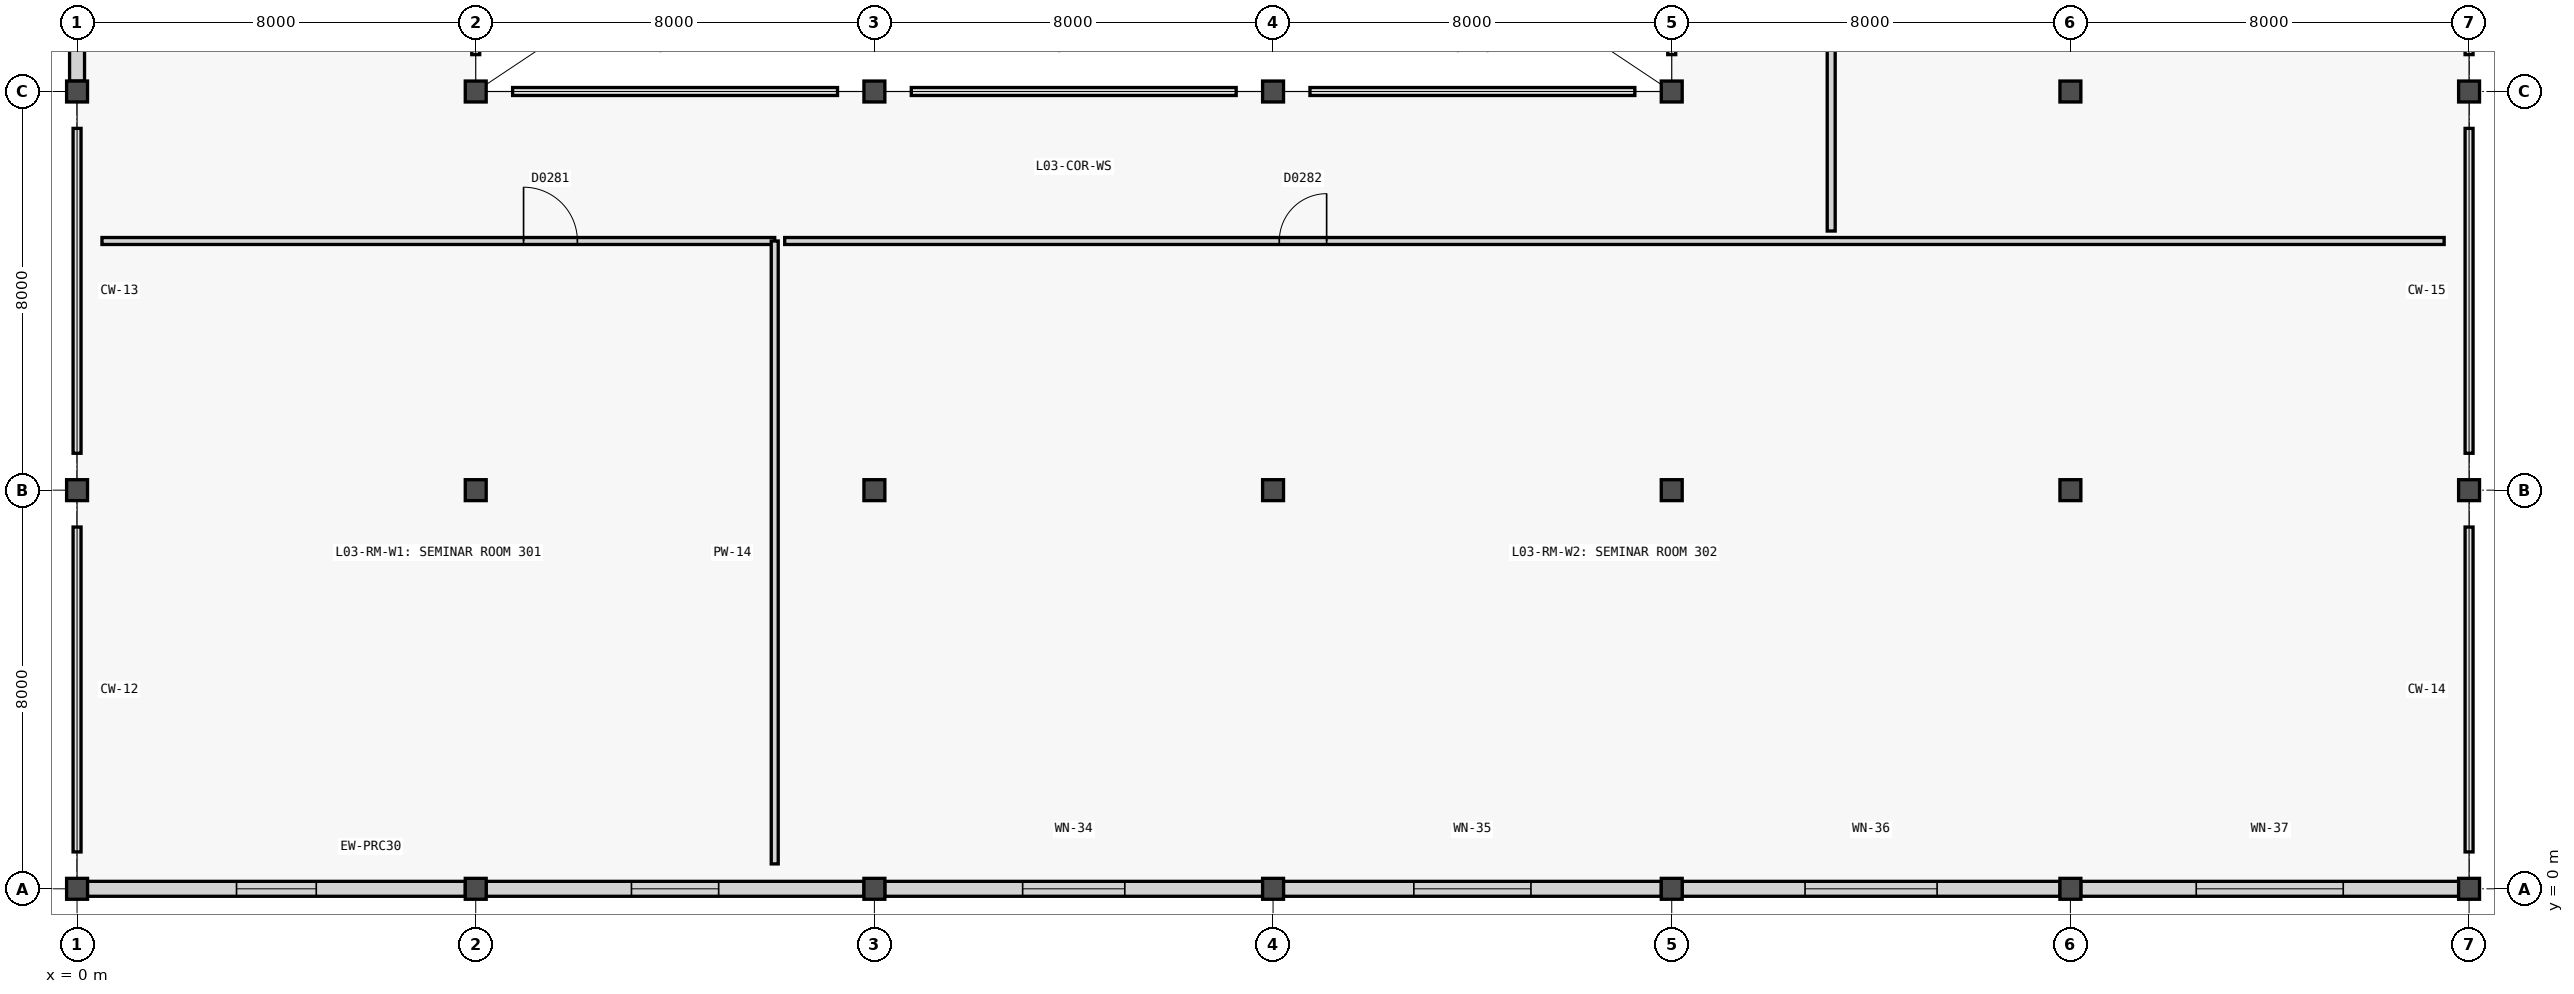
"""IFC4 building model, lengths in metres.
Left out: names, types, materials, properties, quantities, classifications, styles, units other than length and angle.
Written with IfcOpenShell. Run it as: python <this file> out.ifc"""

import sys

from ifc_helpers import new_model, si_unit, direction, frame, frame_2d, origin, origin_2d, place, context, subcontext, project, spatial, rectangle, extrude, element, fill, save


model = new_model("IFC4")
c1 = context("Model", 3, precision=1e-05, world=origin(), true_north=direction((0.0, 1.0)))
c2 = subcontext(c1, "Body", "Model", "MODEL_VIEW")
j1 = project(units=[si_unit("LENGTHUNIT", "METRE"), si_unit("PLANEANGLEUNIT", "RADIAN")], contexts=[c1])
p1 = place(None, origin())
s1 = spatial("IfcSite", under=j1, at=p1, CompositionType="ELEMENT")
p2 = place(p1, origin())
s2 = spatial("IfcBuilding", under=s1, at=p2, CompositionType="ELEMENT")
p3 = place(p2, frame((0.0, 0.0, 14.4)))
s3 = spatial("IfcBuildingStorey", under=s2, at=p3, CompositionType="ELEMENT", Elevation=14.4)
for number, where, z_axis, x_axis in (
    (1, (0.0, 0.0, 0.0), (0.0, 0.0, 1.0), (1.0, 0.0, 0.0)),
    (2, (0.0, 8.0, 0.0), (0.0, 0.0, 1.0), (1.0, 0.0, 0.0)),
):
    element("IfcColumn", number, at=place(p3, frame(where, z_axis=z_axis, x_axis=x_axis)), inside=s3, PredefinedType="COLUMN", context=c2, shape_type="SweptSolid", body=[
        extrude(rectangle(XDim=0.42, YDim=0.42, at=origin_2d()), origin(), (0.0, 0.0, 1.0), 3.34),
    ])
p4 = place(p3, frame((0.0, 16.0, 0.0), z_axis=(0.0, 0.0, 1.0), x_axis=(1.0, 0.0, 0.0)))
e3 = element("IfcColumn", 3, at=p4, inside=s3, PredefinedType="COLUMN", context=c2, shape_type="SweptSolid", body=[
    extrude(rectangle(XDim=0.42, YDim=0.42, at=origin_2d()), origin(), (0.0, 0.0, 1.0), 3.6),
])
for number, where, z_axis, x_axis in (
    (4, (8.0, 0.0, 0.0), (0.0, 0.0, 1.0), (1.0, 0.0, 0.0)),
    (5, (8.0, 8.0, 0.0), (0.0, 0.0, 1.0), (1.0, 0.0, 0.0)),
):
    element("IfcColumn", number, at=place(p3, frame(where, z_axis=z_axis, x_axis=x_axis)), inside=s3, PredefinedType="COLUMN", context=c2, shape_type="SweptSolid", body=[
        extrude(rectangle(XDim=0.42, YDim=0.42, at=origin_2d()), origin(), (0.0, 0.0, 1.0), 3.34),
    ])
p5 = place(p3, frame((8.0, 16.0, 0.0), z_axis=(0.0, 0.0, 1.0), x_axis=(1.0, 0.0, 0.0)))
e6 = element("IfcColumn", 6, at=p5, inside=s3, PredefinedType="COLUMN", context=c2, shape_type="SweptSolid", body=[
    extrude(rectangle(XDim=0.42, YDim=0.42, at=origin_2d()), origin(), (0.0, 0.0, 1.0), 3.6),
])
for number, where, z_axis, x_axis in (
    (7, (16.0, 0.0, 0.0), (0.0, 0.0, 1.0), (1.0, 0.0, 0.0)),
    (8, (16.0, 8.0, 0.0), (0.0, 0.0, 1.0), (1.0, 0.0, 0.0)),
):
    element("IfcColumn", number, at=place(p3, frame(where, z_axis=z_axis, x_axis=x_axis)), inside=s3, PredefinedType="COLUMN", context=c2, shape_type="SweptSolid", body=[
        extrude(rectangle(XDim=0.42, YDim=0.42, at=origin_2d()), origin(), (0.0, 0.0, 1.0), 3.34),
    ])
p6 = place(p3, frame((16.0, 16.0, 0.0), z_axis=(0.0, 0.0, 1.0), x_axis=(1.0, 0.0, 0.0)))
e9 = element("IfcColumn", 9, at=p6, inside=s3, PredefinedType="COLUMN", context=c2, shape_type="SweptSolid", body=[
    extrude(rectangle(XDim=0.42, YDim=0.42, at=origin_2d()), origin(), (0.0, 0.0, 1.0), 3.6),
])
for number, where, z_axis, x_axis in (
    (10, (24.0, 0.0, 0.0), (0.0, 0.0, 1.0), (1.0, 0.0, 0.0)),
    (11, (24.0, 8.0, 0.0), (0.0, 0.0, 1.0), (1.0, 0.0, 0.0)),
):
    element("IfcColumn", number, at=place(p3, frame(where, z_axis=z_axis, x_axis=x_axis)), inside=s3, PredefinedType="COLUMN", context=c2, shape_type="SweptSolid", body=[
        extrude(rectangle(XDim=0.42, YDim=0.42, at=origin_2d()), origin(), (0.0, 0.0, 1.0), 3.34),
    ])
p7 = place(p3, frame((24.0, 16.0, 0.0), z_axis=(0.0, 0.0, 1.0), x_axis=(1.0, 0.0, 0.0)))
e12 = element("IfcColumn", 12, at=p7, inside=s3, PredefinedType="COLUMN", context=c2, shape_type="SweptSolid", body=[
    extrude(rectangle(XDim=0.42, YDim=0.42, at=origin_2d()), origin(), (0.0, 0.0, 1.0), 3.6),
])
for number, where, z_axis, x_axis in (
    (13, (32.0, 0.0, 0.0), (0.0, 0.0, 1.0), (1.0, 0.0, 0.0)),
    (14, (32.0, 8.0, 0.0), (0.0, 0.0, 1.0), (1.0, 0.0, 0.0)),
):
    element("IfcColumn", number, at=place(p3, frame(where, z_axis=z_axis, x_axis=x_axis)), inside=s3, PredefinedType="COLUMN", context=c2, shape_type="SweptSolid", body=[
        extrude(rectangle(XDim=0.42, YDim=0.42, at=origin_2d()), origin(), (0.0, 0.0, 1.0), 3.34),
    ])
p8 = place(p3, frame((32.0, 16.0, 0.0), z_axis=(0.0, 0.0, 1.0), x_axis=(1.0, 0.0, 0.0)))
e15 = element("IfcColumn", 15, at=p8, inside=s3, PredefinedType="COLUMN", context=c2, shape_type="SweptSolid", body=[
    extrude(rectangle(XDim=0.42, YDim=0.42, at=origin_2d()), origin(), (0.0, 0.0, 1.0), 3.6),
])
for number, where, z_axis, x_axis in (
    (16, (40.0, 0.0, 0.0), (0.0, 0.0, 1.0), (1.0, 0.0, 0.0)),
    (17, (40.0, 8.0, 0.0), (0.0, 0.0, 1.0), (1.0, 0.0, 0.0)),
):
    element("IfcColumn", number, at=place(p3, frame(where, z_axis=z_axis, x_axis=x_axis)), inside=s3, PredefinedType="COLUMN", context=c2, shape_type="SweptSolid", body=[
        extrude(rectangle(XDim=0.42, YDim=0.42, at=origin_2d()), origin(), (0.0, 0.0, 1.0), 3.34),
    ])
p9 = place(p3, frame((40.0, 16.0, 0.0), z_axis=(0.0, 0.0, 1.0), x_axis=(1.0, 0.0, 0.0)))
e18 = element("IfcColumn", 18, at=p9, inside=s3, PredefinedType="COLUMN", context=c2, shape_type="SweptSolid", body=[
    extrude(rectangle(XDim=0.42, YDim=0.42, at=origin_2d()), origin(), (0.0, 0.0, 1.0), 3.6),
])
for number, where, z_axis, x_axis in (
    (19, (48.0, 0.0, 0.0), (0.0, 0.0, 1.0), (1.0, 0.0, 0.0)),
    (20, (48.0, 8.0, 0.0), (0.0, 0.0, 1.0), (1.0, 0.0, 0.0)),
):
    element("IfcColumn", number, at=place(p3, frame(where, z_axis=z_axis, x_axis=x_axis)), inside=s3, PredefinedType="COLUMN", context=c2, shape_type="SweptSolid", body=[
        extrude(rectangle(XDim=0.42, YDim=0.42, at=origin_2d()), origin(), (0.0, 0.0, 1.0), 3.34),
    ])
p10 = place(p3, frame((48.0, 16.0, 0.0), z_axis=(0.0, 0.0, 1.0), x_axis=(1.0, 0.0, 0.0)))
e21 = element("IfcColumn", 21, at=p10, inside=s3, PredefinedType="COLUMN", context=c2, shape_type="SweptSolid", body=[
    extrude(rectangle(XDim=0.42, YDim=0.42, at=origin_2d()), origin(), (0.0, 0.0, 1.0), 3.6),
])
p11 = place(p3, frame((0.0, 16.208, 0.0), z_axis=(0.0, 0.0, 1.0), x_axis=(0.0, 1.0, 0.0)))
e22 = element("IfcWall", 22, at=p11, inside=s3, PredefinedType="SOLIDWALL", context=c2, shape_type="SweptSolid", body=[
    extrude(rectangle(XDim=7.584, YDim=0.3, at=frame_2d((3.792, 0.0))), origin(), (0.0, 0.0, 1.0), 2.78),
])
p12 = place(p11, frame((3.092, 0.0, 0.79)))
e23 = element("IfcOpeningElement", 23, at=p12, cuts=e22, PredefinedType="OPENING", context=c2, shape_type="SweptSolid", body=[
    extrude(rectangle(XDim=1.4, YDim=1.85, at=frame_2d((0.7, 0.925))), frame((0.0, 0.16, 0.0), z_axis=(0.0, -1.0, 0.0), x_axis=(1.0, 0.0, 0.0)), (0.0, 0.0, 1.0), 0.32),
])
p13 = place(p3, frame((7.792, 0.0, 0.0), z_axis=(0.0, 0.0, 1.0), x_axis=(-1.0, 0.0, 0.0)))
e24 = element("IfcWall", 24, at=p13, inside=s3, PredefinedType="SOLIDWALL", context=c2, shape_type="SweptSolid", body=[
    extrude(rectangle(XDim=7.584, YDim=0.3, at=frame_2d((3.792, 0.0))), origin(), (0.0, 0.0, 1.0), 2.78),
])
p14 = place(p13, frame((2.992, 0.0, 0.69)))
e25 = element("IfcOpeningElement", 25, at=p14, cuts=e24, PredefinedType="OPENING", context=c2, shape_type="SweptSolid", body=[
    extrude(rectangle(XDim=1.6, YDim=1.95, at=frame_2d((0.8, 0.975))), frame((0.0, 0.16, 0.0), z_axis=(0.0, -1.0, 0.0), x_axis=(1.0, 0.0, 0.0)), (0.0, 0.0, 1.0), 0.32),
])
p15 = place(p3, frame((15.792, 0.0, 0.0), z_axis=(0.0, 0.0, 1.0), x_axis=(-1.0, 0.0, 0.0)))
e26 = element("IfcWall", 26, at=p15, inside=s3, PredefinedType="SOLIDWALL", context=c2, shape_type="SweptSolid", body=[
    extrude(rectangle(XDim=7.584, YDim=0.3, at=frame_2d((3.792, 0.0))), origin(), (0.0, 0.0, 1.0), 2.78),
])
p16 = place(p15, frame((2.917, 0.0, 0.84)))
e27 = element("IfcOpeningElement", 27, at=p16, cuts=e26, PredefinedType="OPENING", context=c2, shape_type="SweptSolid", body=[
    extrude(rectangle(XDim=1.75, YDim=1.8, at=frame_2d((0.875, 0.9))), frame((0.0, 0.16, 0.0), z_axis=(0.0, -1.0, 0.0), x_axis=(1.0, 0.0, 0.0)), (0.0, 0.0, 1.0), 0.32),
])
p17 = place(p3, frame((23.792, 0.0, 0.0), z_axis=(0.0, 0.0, 1.0), x_axis=(-1.0, 0.0, 0.0)))
e28 = element("IfcWall", 28, at=p17, inside=s3, PredefinedType="SOLIDWALL", context=c2, shape_type="SweptSolid", body=[
    extrude(rectangle(XDim=7.584, YDim=0.3, at=frame_2d((3.792, 0.0))), origin(), (0.0, 0.0, 1.0), 2.78),
])
p18 = place(p17, frame((2.767, 0.0, 0.88)))
e29 = element("IfcOpeningElement", 29, at=p18, cuts=e28, PredefinedType="OPENING", context=c2, shape_type="SweptSolid", body=[
    extrude(rectangle(XDim=2.05, YDim=1.45, at=frame_2d((1.025, 0.725))), frame((0.0, 0.16, 0.0), z_axis=(0.0, -1.0, 0.0), x_axis=(1.0, 0.0, 0.0)), (0.0, 0.0, 1.0), 0.32),
])
p19 = place(p3, frame((31.792, 0.0, 0.0), z_axis=(0.0, 0.0, 1.0), x_axis=(-1.0, 0.0, 0.0)))
e30 = element("IfcWall", 30, at=p19, inside=s3, PredefinedType="SOLIDWALL", context=c2, shape_type="SweptSolid", body=[
    extrude(rectangle(XDim=7.584, YDim=0.3, at=frame_2d((3.792, 0.0))), origin(), (0.0, 0.0, 1.0), 2.78),
])
p20 = place(p19, frame((2.617, 0.0, 0.88)))
e31 = element("IfcOpeningElement", 31, at=p20, cuts=e30, PredefinedType="OPENING", context=c2, shape_type="SweptSolid", body=[
    extrude(rectangle(XDim=2.35, YDim=1.4, at=frame_2d((1.175, 0.7))), frame((0.0, 0.16, 0.0), z_axis=(0.0, -1.0, 0.0), x_axis=(1.0, 0.0, 0.0)), (0.0, 0.0, 1.0), 0.32),
])
p21 = place(p3, frame((39.792, 0.0, 0.0), z_axis=(0.0, 0.0, 1.0), x_axis=(-1.0, 0.0, 0.0)))
e32 = element("IfcWall", 32, at=p21, inside=s3, PredefinedType="SOLIDWALL", context=c2, shape_type="SweptSolid", body=[
    extrude(rectangle(XDim=7.584, YDim=0.3, at=frame_2d((3.792, 0.0))), origin(), (0.0, 0.0, 1.0), 2.78),
])
p22 = place(p21, frame((2.467, 0.0, 0.88)))
e33 = element("IfcOpeningElement", 33, at=p22, cuts=e32, PredefinedType="OPENING", context=c2, shape_type="SweptSolid", body=[
    extrude(rectangle(XDim=2.65, YDim=1.5, at=frame_2d((1.325, 0.75))), frame((0.0, 0.16, 0.0), z_axis=(0.0, -1.0, 0.0), x_axis=(1.0, 0.0, 0.0)), (0.0, 0.0, 1.0), 0.32),
])
p23 = place(p3, frame((47.792, 0.0, 0.0), z_axis=(0.0, 0.0, 1.0), x_axis=(-1.0, 0.0, 0.0)))
e34 = element("IfcWall", 34, at=p23, inside=s3, PredefinedType="SOLIDWALL", context=c2, shape_type="SweptSolid", body=[
    extrude(rectangle(XDim=7.584, YDim=0.3, at=frame_2d((3.792, 0.0))), origin(), (0.0, 0.0, 1.0), 2.78),
])
p24 = place(p23, frame((2.317, 0.0, 0.88)))
e35 = element("IfcOpeningElement", 35, at=p24, cuts=e34, PredefinedType="OPENING", context=c2, shape_type="SweptSolid", body=[
    extrude(rectangle(XDim=2.95, YDim=1.55, at=frame_2d((1.475, 0.775))), frame((0.0, 0.16, 0.0), z_axis=(0.0, -1.0, 0.0), x_axis=(1.0, 0.0, 0.0)), (0.0, 0.0, 1.0), 0.32),
])
p25 = place(p3, frame((0.5, 13.0, 0.0), z_axis=(0.0, 0.0, 1.0), x_axis=(1.0, 0.0, 0.0)))
e36 = element("IfcWall", 36, at=p25, inside=s3, PredefinedType="PARTITIONING", context=c2, shape_type="SweptSolid", body=[
    extrude(rectangle(XDim=13.5, YDim=0.14, at=frame_2d((6.75, 0.0))), origin(), (0.0, 0.0, 1.0), 3.34),
])
p26 = place(p25, frame((8.46, 0.0, 0.0)))
e37 = element("IfcOpeningElement", 37, at=p26, cuts=e36, PredefinedType="OPENING", context=c2, shape_type="SweptSolid", body=[
    extrude(rectangle(XDim=1.08, YDim=2.2, at=frame_2d((0.54, 1.1))), frame((0.0, 0.08, 0.0), z_axis=(0.0, -1.0, 0.0), x_axis=(1.0, 0.0, 0.0)), (0.0, 0.0, 1.0), 0.16),
])
p27 = place(p3, frame((14.0, 0.5, 0.0), z_axis=(0.0, 0.0, 1.0), x_axis=(0.0, 1.0, 0.0)))
e38 = element("IfcWall", 38, at=p27, inside=s3, PredefinedType="PARTITIONING", context=c2, shape_type="SweptSolid", body=[
    extrude(rectangle(XDim=12.5, YDim=0.14, at=frame_2d((6.25, 0.0))), origin(), (0.0, 0.0, 1.0), 3.34),
])
p28 = place(p3, frame((14.2, 13.0, 0.0), z_axis=(0.0, 0.0, 1.0), x_axis=(1.0, 0.0, 0.0)))
e39 = element("IfcWall", 39, at=p28, inside=s3, PredefinedType="PARTITIONING", context=c2, shape_type="SweptSolid", body=[
    extrude(rectangle(XDim=33.3, YDim=0.14, at=frame_2d((16.65, 0.0))), origin(), (0.0, 0.0, 1.0), 3.34),
])
p29 = place(p28, frame((9.925, 0.0, 0.0)))
e40 = element("IfcOpeningElement", 40, at=p29, cuts=e39, PredefinedType="OPENING", context=c2, shape_type="SweptSolid", body=[
    extrude(rectangle(XDim=0.95, YDim=2.1, at=frame_2d((0.475, 1.05))), frame((0.0, 0.08, 0.0), z_axis=(0.0, -1.0, 0.0), x_axis=(1.0, 0.0, 0.0)), (0.0, 0.0, 1.0), 0.16),
])
p30 = place(p3, frame((35.2, 13.2, 0.0), z_axis=(0.0, 0.0, 1.0), x_axis=(0.0, 1.0, 0.0)))
e41 = element("IfcWall", 41, at=p30, inside=s3, PredefinedType="PARTITIONING", context=c2, shape_type="SweptSolid", body=[
    extrude(rectangle(XDim=26.6, YDim=0.16, at=frame_2d((13.3, 0.0))), origin(), (0.0, 0.0, 1.0), 3.34),
])
p31 = place(p30, frame((13.825, 0.0, 0.0)))
e42 = element("IfcOpeningElement", 42, at=p31, cuts=e41, PredefinedType="OPENING", context=c2, shape_type="SweptSolid", body=[
    extrude(rectangle(XDim=1.75, YDim=2.2, at=frame_2d((0.875, 1.1))), frame((0.0, 0.09, 0.0), z_axis=(0.0, -1.0, 0.0), x_axis=(1.0, 0.0, 0.0)), (0.0, 0.0, 1.0), 0.18),
])
p32 = place(p14, origin())
e43 = element("IfcWindow", 43, at=p32, inside=s3, PartitioningType="SINGLE_PANEL", PredefinedType="WINDOW", context=c2, shape_type="SweptSolid", body=[
    extrude(rectangle(XDim=1.6, YDim=1.95, at=frame_2d((0.8, 0.975))), frame((0.0, 0.03, 0.0), z_axis=(0.0, -1.0, 0.0), x_axis=(1.0, 0.0, 0.0)), (0.0, 0.0, 1.0), 0.06),
])
fill(e25, e43)
p33 = place(p16, origin())
e44 = element("IfcWindow", 44, at=p33, inside=s3, PartitioningType="SINGLE_PANEL", PredefinedType="WINDOW", context=c2, shape_type="SweptSolid", body=[
    extrude(rectangle(XDim=1.75, YDim=1.8, at=frame_2d((0.875, 0.9))), frame((0.0, 0.03, 0.0), z_axis=(0.0, -1.0, 0.0), x_axis=(1.0, 0.0, 0.0)), (0.0, 0.0, 1.0), 0.06),
])
fill(e27, e44)
p34 = place(p18, origin())
e45 = element("IfcWindow", 45, at=p34, inside=s3, PartitioningType="SINGLE_PANEL", PredefinedType="WINDOW", context=c2, shape_type="SweptSolid", body=[
    extrude(rectangle(XDim=2.05, YDim=1.45, at=frame_2d((1.025, 0.725))), frame((0.0, 0.03, 0.0), z_axis=(0.0, -1.0, 0.0), x_axis=(1.0, 0.0, 0.0)), (0.0, 0.0, 1.0), 0.06),
])
fill(e29, e45)
p35 = place(p20, origin())
e46 = element("IfcWindow", 46, at=p35, inside=s3, PartitioningType="SINGLE_PANEL", PredefinedType="WINDOW", context=c2, shape_type="SweptSolid", body=[
    extrude(rectangle(XDim=2.35, YDim=1.4, at=frame_2d((1.175, 0.7))), frame((0.0, 0.03, 0.0), z_axis=(0.0, -1.0, 0.0), x_axis=(1.0, 0.0, 0.0)), (0.0, 0.0, 1.0), 0.06),
])
fill(e31, e46)
p36 = place(p22, origin())
e47 = element("IfcWindow", 47, at=p36, inside=s3, PartitioningType="SINGLE_PANEL", PredefinedType="WINDOW", context=c2, shape_type="SweptSolid", body=[
    extrude(rectangle(XDim=2.65, YDim=1.5, at=frame_2d((1.325, 0.75))), frame((0.0, 0.03, 0.0), z_axis=(0.0, -1.0, 0.0), x_axis=(1.0, 0.0, 0.0)), (0.0, 0.0, 1.0), 0.06),
])
fill(e33, e47)
p37 = place(p24, origin())
e48 = element("IfcWindow", 48, at=p37, inside=s3, PartitioningType="SINGLE_PANEL", PredefinedType="WINDOW", context=c2, shape_type="SweptSolid", body=[
    extrude(rectangle(XDim=2.95, YDim=1.55, at=frame_2d((1.475, 0.775))), frame((0.0, 0.03, 0.0), z_axis=(0.0, -1.0, 0.0), x_axis=(1.0, 0.0, 0.0)), (0.0, 0.0, 1.0), 0.06),
])
fill(e35, e48)
p38 = place(p26, origin())
e49 = element("IfcDoor", 49, at=p38, inside=s3, OperationType="SINGLE_SWING_LEFT", PredefinedType="DOOR", context=c2, shape_type="SweptSolid", body=[
    extrude(rectangle(XDim=1.08, YDim=2.2, at=frame_2d((0.54, 1.1))), frame((0.0, 0.025, 0.0), z_axis=(0.0, -1.0, 0.0), x_axis=(1.0, 0.0, 0.0)), (0.0, 0.0, 1.0), 0.05),
])
fill(e37, e49)
p39 = place(p29, origin())
e50 = element("IfcDoor", 50, at=p39, inside=s3, OperationType="SINGLE_SWING_RIGHT", PredefinedType="DOOR", context=c2, shape_type="SweptSolid", body=[
    extrude(rectangle(XDim=0.95, YDim=2.1, at=frame_2d((0.475, 1.05))), frame((0.0, 0.025, 0.0), z_axis=(0.0, -1.0, 0.0), x_axis=(1.0, 0.0, 0.0)), (0.0, 0.0, 1.0), 0.05),
])
fill(e40, e50)
save(model, sys.argv[1])
